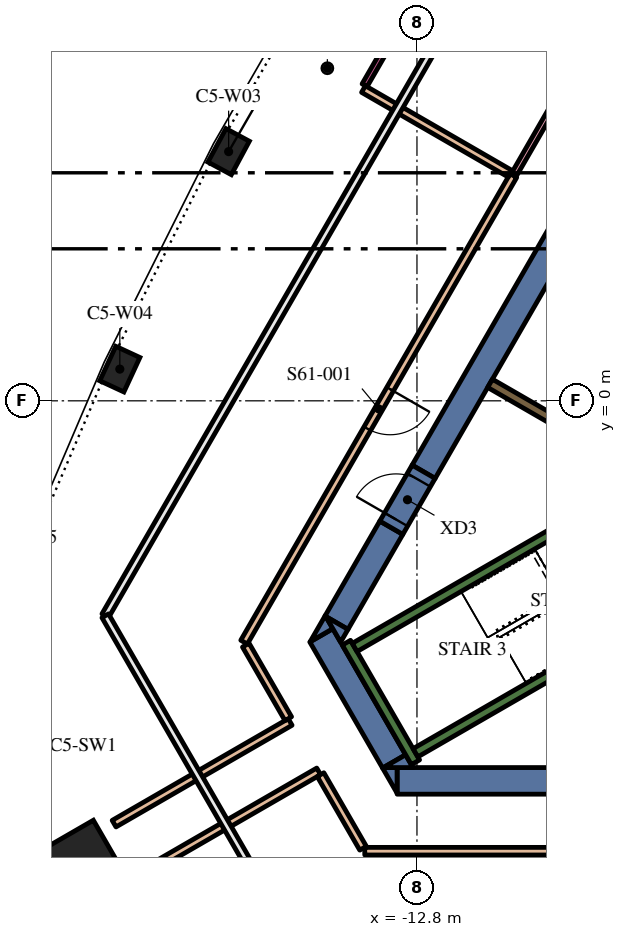
"""IFC4 building model, lengths in metres.
Left out: names, types, materials, properties, quantities, classifications, styles, units other than length and angle.
Written with IfcOpenShell. Run it as: python <this file> out.ifc"""

import sys

from ifc_helpers import new_model, si_unit, direction, frame, frame_2d, origin, origin_2d, place, context, subcontext, project, spatial, polyline, rectangle, outline, extrude, element, fill, save


model = new_model("IFC4")
c1 = context("Model", 3, precision=1e-05, world=origin(), true_north=direction((0.0, 1.0)))
c2 = subcontext(c1, "Body", "Model", "MODEL_VIEW")
j1 = project(units=[si_unit("LENGTHUNIT", "METRE"), si_unit("PLANEANGLEUNIT", "RADIAN")], contexts=[c1])
p1 = place(None, origin())
s1 = spatial("IfcSite", under=j1, at=p1, CompositionType="ELEMENT")
p2 = place(p1, origin())
s2 = spatial("IfcBuilding", under=s1, at=p2, CompositionType="ELEMENT")
p3 = place(p2, frame((0.0, 0.0, 261.6)))
s3 = spatial("IfcBuildingStorey", under=s2, at=p3, CompositionType="ELEMENT", Elevation=261.6)
p4 = place(p3, frame((-21.718, -12.539, 0.0), z_axis=(0.0, 0.0, 1.0), x_axis=(-0.866025403784, -0.5, 0.0)))
e1 = element("IfcColumn", 1, at=p4, inside=s3, PredefinedType="COLUMN", context=c2, shape_type="SweptSolid", body=[
    extrude(rectangle(XDim=2.2, YDim=2.2, at=origin_2d()), origin(), (0.0, 0.0, 1.0), 5.4),
])
for number, where, z_axis, x_axis in (
    (2, (-17.756, 6.557, 0.0), (0.0, 0.0, 1.0), (-0.474, -0.881, 0.0)),
    (3, (-20.619, 0.834, 0.0), (0.0, 0.0, 1.0), (-0.421, -0.907, 0.0)),
):
    element("IfcColumn", number, at=place(p3, frame(where, z_axis=z_axis, x_axis=x_axis)), inside=s3, PredefinedType="COLUMN", context=c2, shape_type="SweptSolid", body=[
        extrude(rectangle(XDim=1.0, YDim=0.7, at=origin_2d()), origin(), (0.0, 0.0, 1.0), 5.4),
    ])
p5 = place(p3, frame((8.904, -10.0, 0.0), z_axis=(0.0, 0.0, 1.0), x_axis=(-1.0, 0.0, 0.0)))
e4 = element("IfcWall", 4, at=p5, inside=s3, PredefinedType="SOLIDWALL", context=c2, shape_type="SweptSolid", body=[
    extrude(rectangle(XDim=22.226, YDim=0.7, at=frame_2d((11.113, 0.0))), origin(), (0.0, 0.0, 1.0), 5.4),
])
p6 = place(p3, origin())
e5 = element("IfcWall", 5, at=p6, inside=s3, PredefinedType="SOLIDWALL", context=c2, shape_type="SweptSolid", body=[
    extrude(outline(polyline([(-13.712, -9.65), (-13.324, -9.65), (-13.324, -10.322), (-13.712, -9.65)])), origin(), (0.0, 0.0, 1.0), 5.4),
])
p7 = place(p3, frame((-13.402, -9.487, 0.0), z_axis=(0.0, 0.0, 1.0), x_axis=(-0.500020498207, 0.866013568815, 0.0)))
e6 = element("IfcWall", 6, at=p7, inside=s3, PredefinedType="SOLIDWALL", context=c2, shape_type="SweptSolid", body=[
    extrude(rectangle(XDim=3.829, YDim=0.7, at=frame_2d((1.915, 0.0))), origin(), (0.0, 0.0, 1.0), 5.4),
])
e7 = element("IfcWall", 7, at=p6, inside=s3, PredefinedType="SOLIDWALL", context=c2, shape_type="SweptSolid", body=[
    extrude(outline(polyline([(-15.014, -5.995), (-15.611, -6.339), (-15.213, -5.65), (-15.014, -5.995)])), origin(), (0.0, 0.0, 1.0), 5.4),
])
e8 = element("IfcWall", 8, at=p6, inside=s3, PredefinedType="SOLIDWALL", context=c2, shape_type="SweptSolid", body=[
    extrude(outline(polyline([(-12.904, -9.65), (-13.68, -9.65), (-13.098, -9.314), (-12.904, -9.65)])), origin(), (0.0, 0.0, 1.0), 5.4),
])
p8 = place(p3, frame((-13.475, -3.339, 0.0), z_axis=(0.0, 0.0, 1.0), x_axis=(-0.500008214683, -0.866020660983, 0.0)))
e9 = element("IfcWall", 9, at=p8, inside=s3, PredefinedType="SOLIDWALL", context=c2, shape_type="SweptSolid", body=[
    extrude(rectangle(XDim=2.884, YDim=0.7, at=frame_2d((1.442, 0.0))), origin(), (0.0, 0.0, 1.0), 5.4),
])
e10 = element("IfcWall", 10, at=p6, inside=s3, PredefinedType="SOLIDWALL", context=c2, shape_type="SweptSolid", body=[
    extrude(outline(polyline([(-14.809, -6.35), (-15.197, -5.678), (-14.615, -6.014), (-14.809, -6.35)])), origin(), (0.0, 0.0, 1.0), 5.4),
])
p9 = place(p3, frame((-12.625, -1.867, 0.0), z_axis=(0.0, 0.0, 1.0), x_axis=(0.499996974394, 0.866027150612, 0.0)))
e11 = element("IfcWall", 11, at=p9, inside=s3, PredefinedType="SOLIDWALL", context=c2, shape_type="SweptSolid", body=[
    extrude(rectangle(XDim=15.858, YDim=0.7, at=frame_2d((7.929, 0.0))), origin(), (0.0, 0.0, 1.0), 5.4),
])
p10 = place(p3, frame((-12.84, -9.511, 0.0), z_axis=(0.0, 0.0, 1.0), x_axis=(-0.499997733992, 0.866026712061, 0.0)))
e12 = element("IfcWall", 12, at=p10, inside=s3, PredefinedType="SOLIDWALL", context=c2, shape_type="SweptSolid", body=[
    extrude(rectangle(XDim=3.634, YDim=0.25, at=frame_2d((1.817, 0.0))), origin(), (0.0, 0.0, 1.0), 5.4),
])
p11 = place(p3, frame((-14.44, -6.49, 0.0), z_axis=(0.0, 0.0, 1.0), x_axis=(0.866022966069, 0.500004222222, 0.0)))
e13 = element("IfcWall", 13, at=p11, inside=s3, PredefinedType="SOLIDWALL", context=c2, shape_type="SweptSolid", body=[
    extrude(rectangle(XDim=6.8, YDim=0.25, at=frame_2d((3.4, 0.0))), origin(), (0.0, 0.0, 1.0), 5.4),
])
p12 = place(p3, frame((-12.84, -9.261, 0.0), z_axis=(0.0, 0.0, 1.0), x_axis=(0.866016039709, 0.500016218704, 0.0)))
e14 = element("IfcWall", 14, at=p12, inside=s3, PredefinedType="SOLIDWALL", context=c2, shape_type="SweptSolid", body=[
    extrude(rectangle(XDim=7.05, YDim=0.25, at=frame_2d((3.525, 0.0))), origin(), (0.0, 0.0, 1.0), 5.4),
])
p13 = place(p3, frame((-8.106, -1.14, 0.0), z_axis=(0.0, 0.0, 1.0), x_axis=(-0.866008981251, 0.500028443584, 0.0)))
e15 = element("IfcWall", 15, at=p13, inside=s3, PredefinedType="SOLIDWALL", context=c2, shape_type="SweptSolid", body=[
    extrude(rectangle(XDim=3.2, YDim=0.25, at=frame_2d((1.6, 0.0))), origin(), (0.0, 0.0, 1.0), 5.4),
])
p14 = place(p3, frame((-13.475, -3.339, 0.0), z_axis=(0.0, 0.0, 1.0), x_axis=(0.499954529098, 0.86605165483, 0.0)))
e16 = element("IfcWall", 16, at=p14, inside=s3, PredefinedType="SOLIDWALL", context=c2, shape_type="SweptSolid", body=[
    extrude(rectangle(XDim=1.7, YDim=0.7, at=frame_2d((0.85, 0.0))), origin(), (0.0, 0.0, 1.0), 5.4),
])
p15 = place(p14, frame((0.25, 0.0, 0.0)))
e17 = element("IfcOpeningElement", 17, at=p15, cuts=e16, PredefinedType="OPENING", context=c2, shape_type="SweptSolid", body=[
    extrude(rectangle(XDim=1.2, YDim=2.1, at=frame_2d((0.6, 1.05))), frame((0.0, 0.36, 0.0), z_axis=(0.0, -1.0, 0.0), x_axis=(1.0, 0.0, 0.0)), (0.0, 0.0, 1.0), 0.72),
])
p16 = place(p3, frame((-10.262, 5.925, 0.0), z_axis=(0.0, 0.0, 1.0), x_axis=(-0.499997784101, -0.866026683131, 0.0)))
e18 = element("IfcWall", 18, at=p16, inside=s3, PredefinedType="PARTITIONING", context=c2, shape_type="SweptSolid", body=[
    extrude(rectangle(XDim=14.174, YDim=0.2, at=frame_2d((7.087, 0.0))), origin(), (0.0, 0.0, 1.0), 4.75),
])
p17 = place(p16, frame((6.487, 0.0, 0.0)))
e19 = element("IfcOpeningElement", 19, at=p17, cuts=e18, PredefinedType="OPENING", context=c2, shape_type="SweptSolid", body=[
    extrude(rectangle(XDim=1.2, YDim=2.1, at=frame_2d((0.6, 1.05))), frame((0.0, 0.11, 0.0), z_axis=(0.0, -1.0, 0.0), x_axis=(1.0, 0.0, 0.0)), (0.0, 0.0, 1.0), 0.22),
])
p18 = place(p3, frame((-14.174, -11.85, 0.0), z_axis=(0.0, 0.0, 1.0), x_axis=(1.0, 0.0, 0.0)))
e20 = element("IfcWall", 20, at=p18, inside=s3, PredefinedType="PARTITIONING", context=c2, shape_type="SweptSolid", body=[
    extrude(rectangle(XDim=14.164, YDim=0.2, at=frame_2d((7.082, 0.0))), origin(), (0.0, 0.0, 1.0), 4.75),
])
p19 = place(p18, frame((6.482, 0.0, 0.0)))
e21 = element("IfcOpeningElement", 21, at=p19, cuts=e20, PredefinedType="OPENING", context=c2, shape_type="SweptSolid", body=[
    extrude(rectangle(XDim=1.2, YDim=2.1, at=frame_2d((0.6, 1.05))), frame((0.0, 0.11, 0.0), z_axis=(0.0, -1.0, 0.0), x_axis=(1.0, 0.0, 0.0)), (0.0, 0.0, 1.0), 0.22),
])
p20 = place(p3, frame((-3.175, 18.2, 0.0), z_axis=(0.0, 0.0, 1.0), x_axis=(-0.500015389047, -0.866016518732, 0.0)))
e22 = element("IfcWall", 22, at=p20, inside=s3, PredefinedType="PARTITIONING", context=c2, shape_type="SweptSolid", body=[
    extrude(rectangle(XDim=14.164, YDim=0.15, at=frame_2d((7.082, 0.0))), origin(), (0.0, 0.0, 1.0), 4.75),
])
p21 = place(p20, frame((6.632, 0.0, 0.0)))
e23 = element("IfcOpeningElement", 23, at=p21, cuts=e22, PredefinedType="OPENING", context=c2, shape_type="SweptSolid", body=[
    extrude(rectangle(XDim=0.9, YDim=2.1, at=frame_2d((0.45, 1.05))), frame((0.0, 0.085, 0.0), z_axis=(0.0, -1.0, 0.0), x_axis=(1.0, 0.0, 0.0)), (0.0, 0.0, 1.0), 0.17),
])
for number, where, z_axis, x_axis in (
    (24, (-15.387, -9.75, 0.0), (0.0, 0.0, 1.0), (-0.866, -0.5, 0.0)),
    (25, (-20.77, -11.125, 0.0), (0.0, 0.0, 1.0), (0.866, 0.5, 0.0)),
):
    element("IfcWall", number, at=place(p3, frame(where, z_axis=z_axis, x_axis=x_axis)), inside=s3, PredefinedType="PARTITIONING", context=c2, shape_type="SweptSolid", body=[
        extrude(rectangle(XDim=5.35, YDim=0.2, at=frame_2d((2.675, 0.0))), origin(), (0.0, 0.0, 1.0), 4.75),
    ])
p22 = place(p3, frame((-14.207, 8.203, 0.0), z_axis=(0.0, 0.0, 1.0), x_axis=(0.866022231217, -0.500005495009, 0.0)))
e26 = element("IfcWall", 26, at=p22, inside=s3, PredefinedType="PARTITIONING", context=c2, shape_type="SweptSolid", body=[
    extrude(rectangle(XDim=4.455, YDim=0.2, at=frame_2d((2.228, 0.0))), origin(), (0.0, 0.0, 1.0), 4.75),
])
for number, where, z_axis, x_axis in (
    (27, (-14.219, -11.772, 0.0), (0.0, 0.0, 1.0), (-0.5, 0.866, 0.0)),
    (28, (-16.187, -8.364, 0.0), (0.0, 0.0, 1.0), (-0.5, 0.866, 0.0)),
):
    element("IfcWall", number, at=place(p3, frame(where, z_axis=z_axis, x_axis=x_axis)), inside=s3, PredefinedType="PARTITIONING", context=c2, shape_type="SweptSolid", body=[
        extrude(rectangle(XDim=2.236, YDim=0.2, at=frame_2d((1.118, 0.0))), origin(), (0.0, 0.0, 1.0), 4.75),
    ])
p23 = place(p3, frame((-12.664, 10.927, 0.0), z_axis=(0.0, 0.0, 1.0), x_axis=(-0.499994396859, -0.866028638735, 0.0)))
e29 = element("IfcWall", 29, at=p23, inside=s3, PredefinedType="PARTITIONING", context=c2, shape_type="SweptSolid", body=[
    extrude(rectangle(XDim=3.031, YDim=0.15, at=frame_2d((1.515, 0.0))), origin(), (0.0, 0.0, 1.0), 5.15),
])
p24 = place(p3, frame((-15.158, 8.751, 0.0), z_axis=(0.0, 0.0, 1.0), x_axis=(-0.5, -0.866025403784, 0.0)))
e30 = element("IfcColumn", 30, at=p24, inside=s3, PredefinedType="USERDEFINED", context=c2, shape_type="SweptSolid", body=[
    extrude(rectangle(XDim=0.55, YDim=0.55, at=origin_2d()), origin(), (0.0, 0.0, 1.0), 0.7),
])
p25 = place(p15, origin())
e31 = element("IfcDoor", 31, at=p25, inside=s3, OperationType="SINGLE_SWING_LEFT", PredefinedType="DOOR", context=c2, shape_type="SweptSolid", body=[
    extrude(rectangle(XDim=1.2, YDim=2.1, at=frame_2d((0.6, 1.05))), frame((0.0, 0.025, 0.0), z_axis=(0.0, -1.0, 0.0), x_axis=(1.0, 0.0, 0.0)), (0.0, 0.0, 1.0), 0.05),
])
fill(e17, e31)
p26 = place(p17, origin())
e32 = element("IfcDoor", 32, at=p26, inside=s3, OperationType="SINGLE_SWING_RIGHT", PredefinedType="DOOR", context=c2, shape_type="SweptSolid", body=[
    extrude(rectangle(XDim=1.2, YDim=2.1, at=frame_2d((0.6, 1.05))), frame((0.0, 0.025, 0.0), z_axis=(0.0, -1.0, 0.0), x_axis=(1.0, 0.0, 0.0)), (0.0, 0.0, 1.0), 0.05),
])
fill(e19, e32)
save(model, sys.argv[1])
